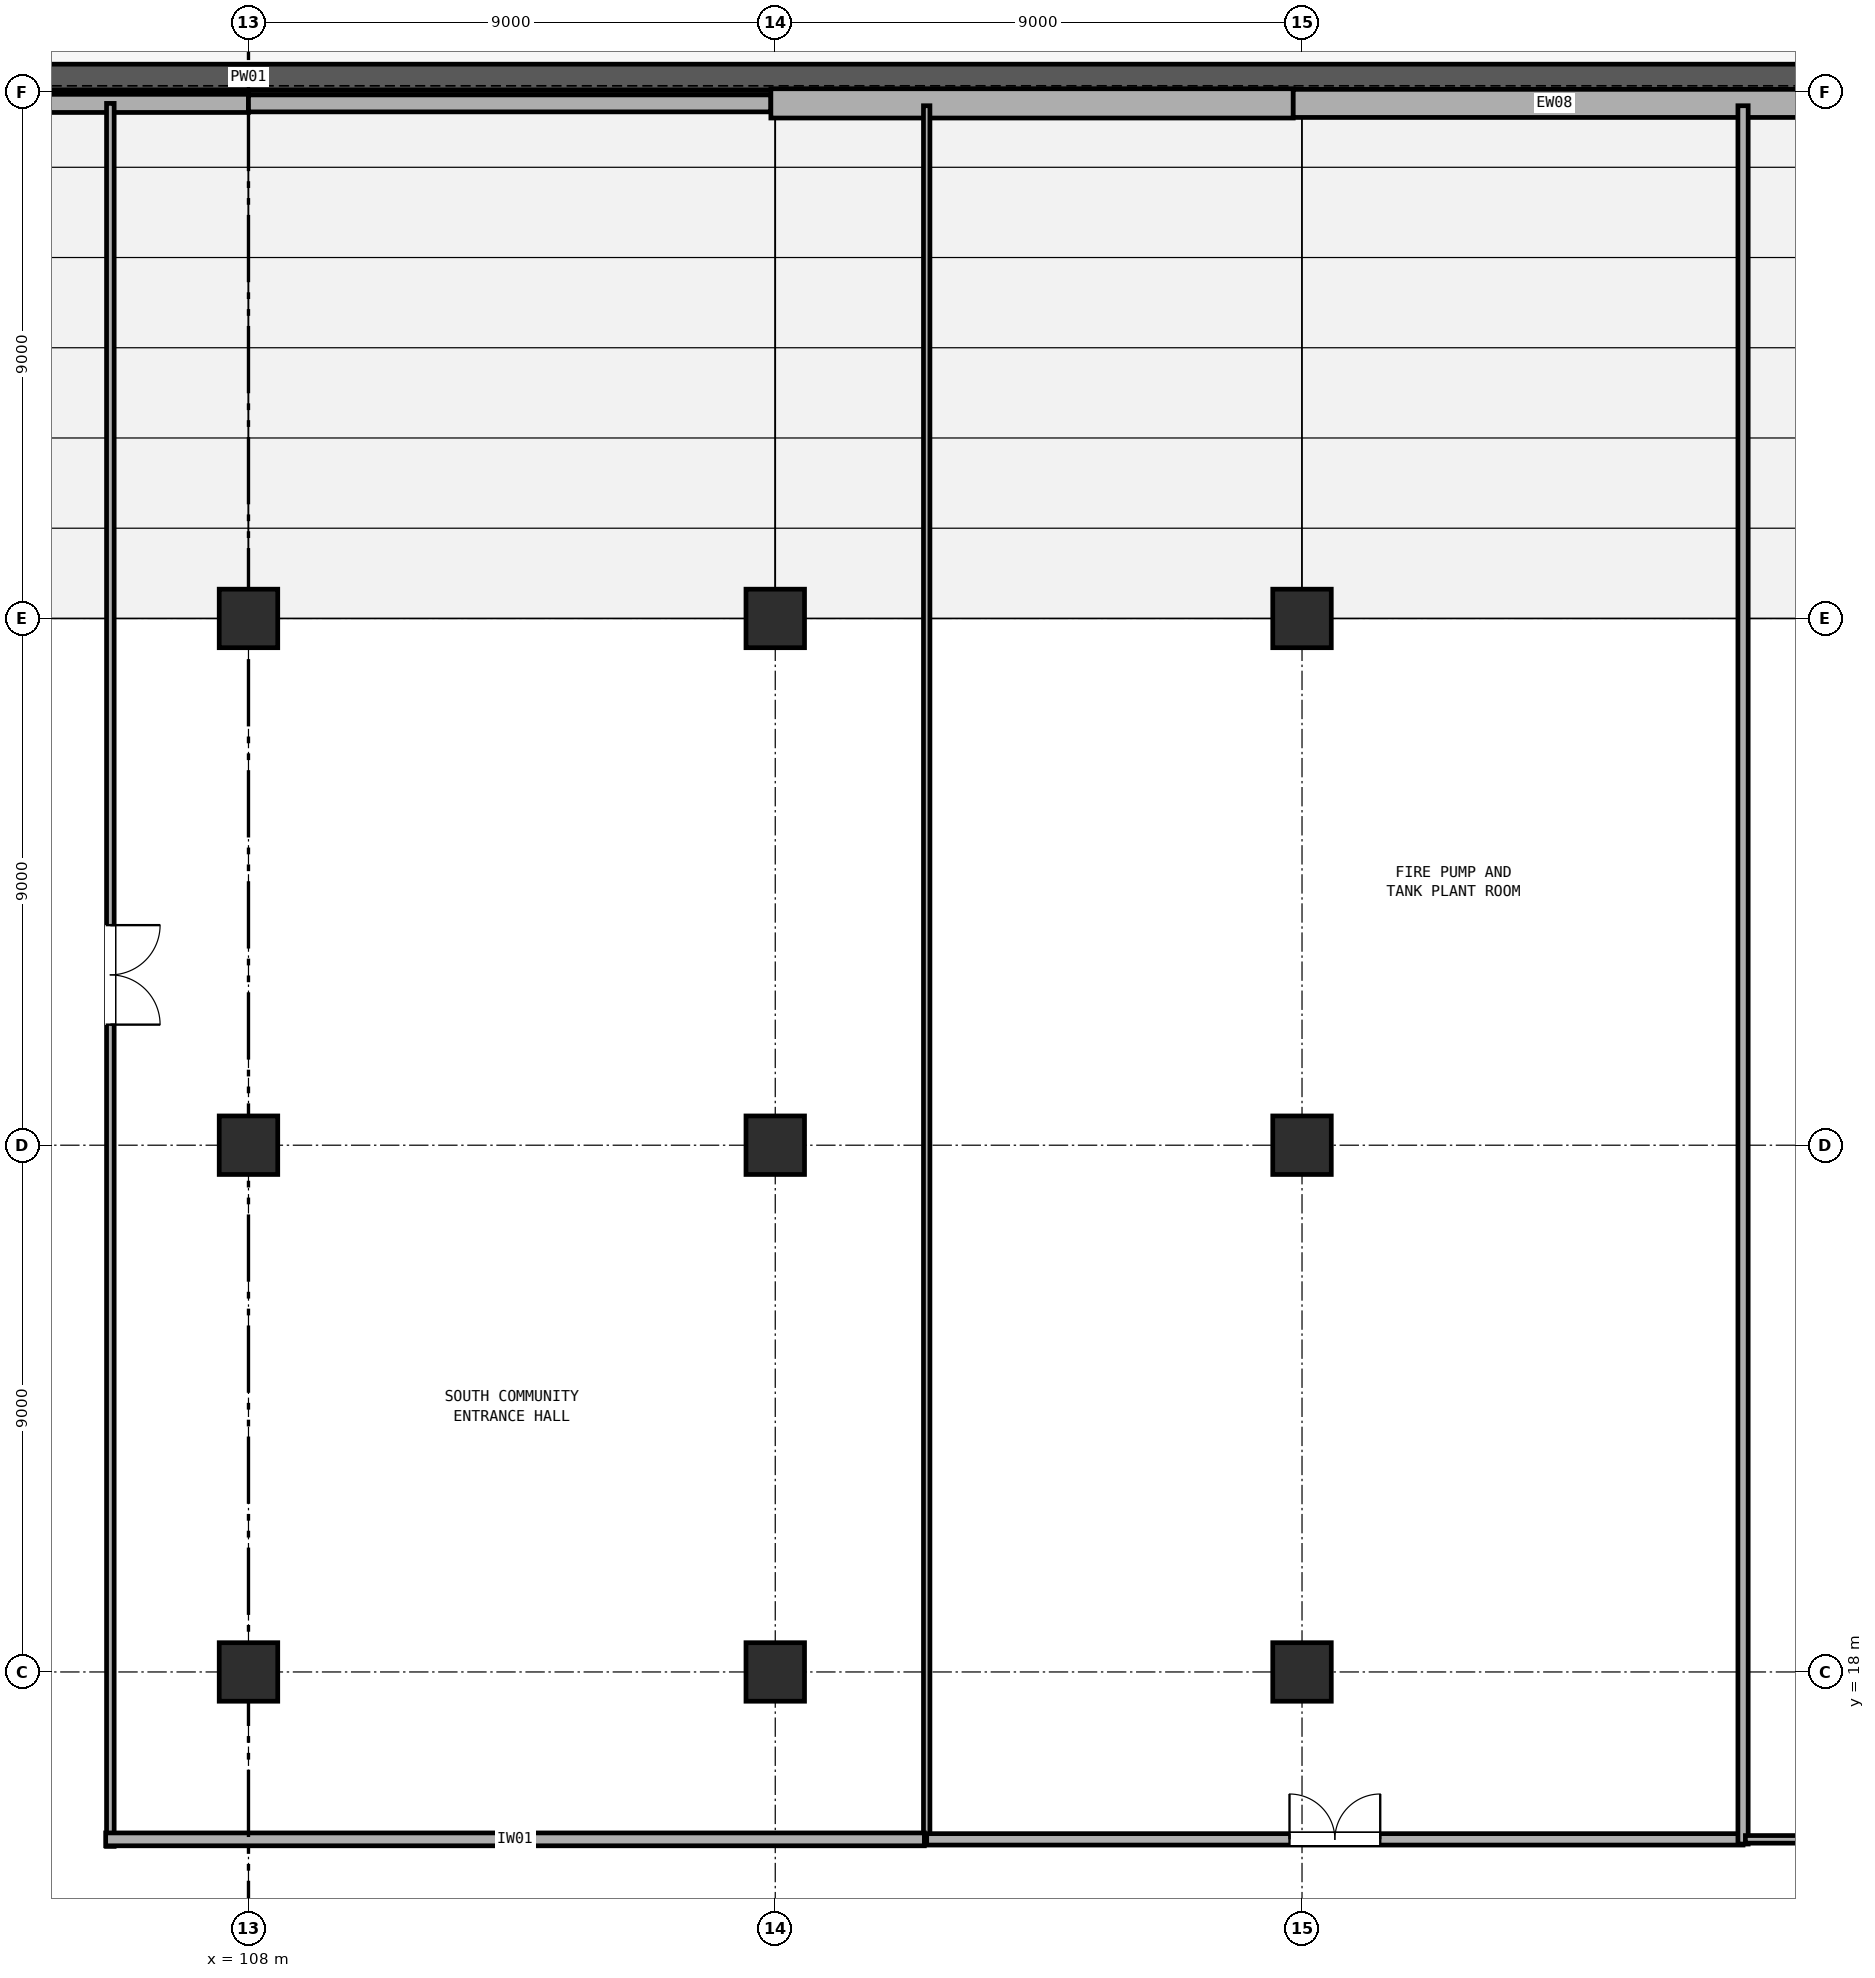
"""IFC4 building model, lengths in metres.
Left out: names, types, materials, properties, quantities, classifications, styles, units other than length and angle.
Written with IfcOpenShell. Run it as: python <this file> out.ifc"""

import sys

from ifc_helpers import new_model, si_unit, direction, frame, frame_2d, origin, origin_2d, place, context, subcontext, project, spatial, rectangle, extrude, element, fill, save


model = new_model("IFC4")
c1 = context("Model", 3, precision=1e-05, world=origin(), true_north=direction((0.0, 1.0)))
c2 = subcontext(c1, "Body", "Model", "MODEL_VIEW")
j1 = project(units=[si_unit("LENGTHUNIT", "METRE"), si_unit("PLANEANGLEUNIT", "RADIAN")], contexts=[c1])
p1 = place(None, origin())
s1 = spatial("IfcSite", under=j1, at=p1, CompositionType="ELEMENT")
p2 = place(p1, origin())
s2 = spatial("IfcBuilding", under=s1, at=p2, CompositionType="ELEMENT")
p3 = place(p2, origin())
s3 = spatial("IfcBuildingStorey", under=s2, at=p3, CompositionType="ELEMENT", Elevation=0.0)
for number, where, z_axis, x_axis in (
    (1, (108.0, 18.0, 0.0), (0.0, 0.0, 1.0), (1.0, 0.0, 0.0)),
    (2, (108.0, 27.0, 0.0), (0.0, 0.0, 1.0), (1.0, 0.0, 0.0)),
    (3, (108.0, 36.0, 0.0), (0.0, 0.0, 1.0), (1.0, 0.0, 0.0)),
    (4, (117.0, 18.0, 0.0), (0.0, 0.0, 1.0), (1.0, 0.0, 0.0)),
    (5, (117.0, 27.0, 0.0), (0.0, 0.0, 1.0), (1.0, 0.0, 0.0)),
    (6, (117.0, 36.0, 0.0), (0.0, 0.0, 1.0), (1.0, 0.0, 0.0)),
    (7, (126.0, 18.0, 0.0), (0.0, 0.0, 1.0), (1.0, 0.0, 0.0)),
    (8, (126.0, 27.0, 0.0), (0.0, 0.0, 1.0), (1.0, 0.0, 0.0)),
    (9, (126.0, 36.0, 0.0), (0.0, 0.0, 1.0), (1.0, 0.0, 0.0)),
):
    element("IfcColumn", number, at=place(p3, frame(where, z_axis=z_axis, x_axis=x_axis)), inside=s3, PredefinedType="COLUMN", context=c2, shape_type="SweptSolid", body=[
        extrude(rectangle(XDim=1.0, YDim=1.0, at=origin_2d()), origin(), (0.0, 0.0, 1.0), 4.8),
    ])
p4 = place(p3, frame((55.1, 45.25, 0.0), z_axis=(0.0, 0.0, 1.0), x_axis=(1.0, 0.0, 0.0)))
e10 = element("IfcWall", 10, at=p4, inside=s3, PredefinedType="SOLIDWALL", context=c2, shape_type="SweptSolid", body=[
    extrude(rectangle(XDim=105.8, YDim=0.44, at=frame_2d((52.9, 0.0))), origin(), (0.0, 0.0, 1.0), 0.9),
])
p5 = place(p3, frame((99.075, 44.8, 0.0), z_axis=(0.0, 0.0, 1.0), x_axis=(1.0, 0.0, 0.0)))
e11 = element("IfcWall", 11, at=p5, inside=s3, PredefinedType="SOLIDWALL", context=c2, shape_type="SweptSolid", body=[
    extrude(rectangle(XDim=8.925, YDim=0.31, at=frame_2d((4.462, 0.0))), origin(), (0.0, 0.0, 1.0), 3.28),
])
p6 = place(p3, frame((108.0, 44.8, 0.0), z_axis=(0.0, 0.0, 1.0), x_axis=(1.0, 0.0, 0.0)))
e12 = element("IfcWall", 12, at=p6, inside=s3, PredefinedType="SOLIDWALL", context=c2, shape_type="SweptSolid", body=[
    extrude(rectangle(XDim=8.925, YDim=0.29, at=frame_2d((4.462, 0.0))), origin(), (0.0, 0.0, 1.0), 3.28),
])
p7 = place(p3, frame((116.925, 44.8, 0.0), z_axis=(0.0, 0.0, 1.0), x_axis=(1.0, 0.0, 0.0)))
e13 = element("IfcWall", 13, at=p7, inside=s3, PredefinedType="SOLIDWALL", context=c2, shape_type="SweptSolid", body=[
    extrude(rectangle(XDim=8.925, YDim=0.5, at=frame_2d((4.462, 0.0))), origin(), (0.0, 0.0, 1.0), 3.28),
])
p8 = place(p3, frame((125.85, 44.8, 0.0), z_axis=(0.0, 0.0, 1.0), x_axis=(1.0, 0.0, 0.0)))
e14 = element("IfcWall", 14, at=p8, inside=s3, PredefinedType="SOLIDWALL", context=c2, shape_type="SweptSolid", body=[
    extrude(rectangle(XDim=8.925, YDim=0.48, at=frame_2d((4.462, 0.0))), origin(), (0.0, 0.0, 1.0), 3.28),
])
p9 = place(p3, frame((105.64, 44.8, 0.0), z_axis=(0.0, 0.0, 1.0), x_axis=(0.0, -1.0, 0.0)))
e15 = element("IfcWall", 15, at=p9, inside=s3, PredefinedType="PARTITIONING", context=c2, shape_type="SweptSolid", body=[
    extrude(rectangle(XDim=29.78, YDim=0.13, at=frame_2d((14.89, 0.0))), origin(), (0.0, 0.0, 1.0), 3.28),
])
p10 = place(p9, frame((14.04, 0.0, 0.0)))
e16 = element("IfcOpeningElement", 16, at=p10, cuts=e15, PredefinedType="OPENING", context=c2, shape_type="SweptSolid", body=[
    extrude(rectangle(XDim=1.7, YDim=2.2, at=frame_2d((0.85, 1.1))), frame((0.0, 0.075, 0.0), z_axis=(0.0, -1.0, 0.0), x_axis=(1.0, 0.0, 0.0)), (0.0, 0.0, 1.0), 0.15),
])
p11 = place(p3, frame((119.587, 44.76, 0.0), z_axis=(0.0, 0.0, 1.0), x_axis=(0.0, -1.0, 0.0)))
e17 = element("IfcWall", 17, at=p11, inside=s3, PredefinedType="PARTITIONING", context=c2, shape_type="SweptSolid", body=[
    extrude(rectangle(XDim=29.7, YDim=0.11, at=frame_2d((14.85, 0.0))), origin(), (0.0, 0.0, 1.0), 3.28),
])
p12 = place(p3, frame((119.548, 15.14, 0.0), z_axis=(0.0, 0.0, 1.0), x_axis=(-1.0, 0.0, 0.0)))
e18 = element("IfcWall", 18, at=p12, inside=s3, PredefinedType="PARTITIONING", context=c2, shape_type="SweptSolid", body=[
    extrude(rectangle(XDim=13.988, YDim=0.22, at=frame_2d((6.994, 0.0))), origin(), (0.0, 0.0, 1.0), 3.28),
])
p13 = place(p3, frame((119.587, 15.14, 0.0), z_axis=(0.0, 0.0, 1.0), x_axis=(1.0, 0.0, 0.0)))
e19 = element("IfcWall", 19, at=p13, inside=s3, PredefinedType="PARTITIONING", context=c2, shape_type="SweptSolid", body=[
    extrude(rectangle(XDim=13.948, YDim=0.195, at=frame_2d((6.974, 0.0))), origin(), (0.0, 0.0, 1.0), 3.28),
])
p14 = place(p13, frame((6.199, 0.0, 0.0)))
e20 = element("IfcOpeningElement", 20, at=p14, cuts=e19, PredefinedType="OPENING", context=c2, shape_type="SweptSolid", body=[
    extrude(rectangle(XDim=1.55, YDim=2.2, at=frame_2d((0.775, 1.1))), frame((0.0, 0.107, 0.0), z_axis=(0.0, -1.0, 0.0), x_axis=(1.0, 0.0, 0.0)), (0.0, 0.0, 1.0), 0.215),
])
p15 = place(p3, frame((133.535, 44.76, 0.0), z_axis=(0.0, 0.0, 1.0), x_axis=(0.0, -1.0, 0.0)))
e21 = element("IfcWall", 21, at=p15, inside=s3, PredefinedType="PARTITIONING", context=c2, shape_type="SweptSolid", body=[
    extrude(rectangle(XDim=29.7, YDim=0.175, at=frame_2d((14.85, 0.0))), origin(), (0.0, 0.0, 1.0), 3.28),
])
p16 = place(p3, frame((145.24, 15.14, 0.0), z_axis=(0.0, 0.0, 1.0), x_axis=(-1.0, 0.0, 0.0)))
e22 = element("IfcWall", 22, at=p16, inside=s3, PredefinedType="PARTITIONING", context=c2, shape_type="SweptSolid", body=[
    extrude(rectangle(XDim=11.665, YDim=0.13, at=frame_2d((5.833, 0.0))), origin(), (0.0, 0.0, 1.0), 3.28),
])
p17 = place(p10, origin())
e23 = element("IfcDoor", 23, at=p17, inside=s3, OperationType="DOUBLE_DOOR_SINGLE_SWING", PredefinedType="DOOR", context=c2, shape_type="SweptSolid", body=[
    extrude(rectangle(XDim=1.7, YDim=2.2, at=frame_2d((0.85, 1.1))), frame((0.0, 0.025, 0.0), z_axis=(0.0, -1.0, 0.0), x_axis=(1.0, 0.0, 0.0)), (0.0, 0.0, 1.0), 0.05),
])
fill(e16, e23)
p18 = place(p14, origin())
e24 = element("IfcDoor", 24, at=p18, inside=s3, OperationType="DOUBLE_DOOR_SINGLE_SWING", PredefinedType="DOOR", context=c2, shape_type="SweptSolid", body=[
    extrude(rectangle(XDim=1.55, YDim=2.2, at=frame_2d((0.775, 1.1))), frame((0.0, 0.025, 0.0), z_axis=(0.0, -1.0, 0.0), x_axis=(1.0, 0.0, 0.0)), (0.0, 0.0, 1.0), 0.05),
])
fill(e20, e24)
save(model, sys.argv[1])
